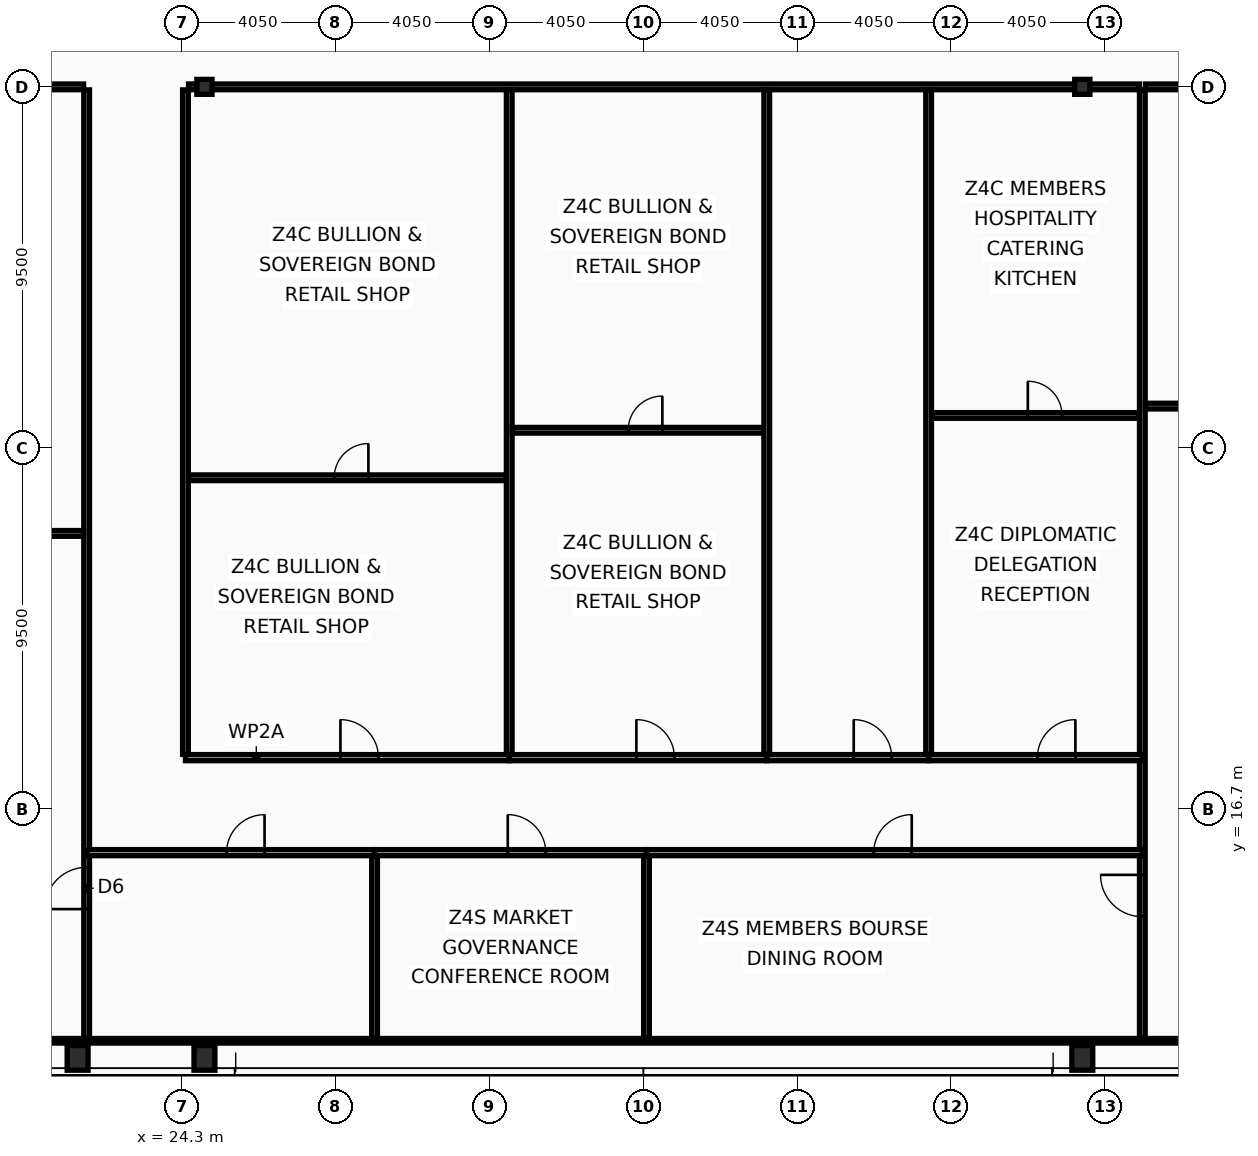
"""IFC4 building model, lengths in metres.
Left out: names, types, materials, properties, quantities, classifications, styles, units other than length and angle.
Written with IfcOpenShell. Run it as: python <this file> out.ifc"""

import sys

from ifc_helpers import new_model, si_unit, direction, frame, frame_2d, origin, origin_2d, place, context, subcontext, project, spatial, rectangle, hollow_rectangle, i_section, extrude, element, fill, save


model = new_model("IFC4")
c1 = context("Model", 3, precision=1e-05, world=origin(), true_north=direction((0.0, 1.0)))
c2 = subcontext(c1, "Body", "Model", "MODEL_VIEW")
j1 = project(units=[si_unit("LENGTHUNIT", "METRE"), si_unit("PLANEANGLEUNIT", "RADIAN")], contexts=[c1])
p1 = place(None, origin())
s1 = spatial("IfcSite", under=j1, at=p1, CompositionType="ELEMENT")
p2 = place(p1, origin())
s2 = spatial("IfcBuilding", under=s1, at=p2, CompositionType="ELEMENT")
p3 = place(p2, frame((0.0, 0.0, 347.0)))
s3 = spatial("IfcBuildingStorey", under=s2, at=p3, CompositionType="ELEMENT", Elevation=347.0)
for number, where, z_axis, x_axis in (
    (1, (21.562, 10.15, 0.0), (0.0, 0.0, 1.0), (1.0, 0.0, 0.0)),
    (2, (24.9, 10.15, 0.0), (0.0, 0.0, 1.0), (1.0, 0.0, 0.0)),
    (3, (48.0, 10.15, 0.0), (0.0, 0.0, 1.0), (1.0, 0.0, 0.0)),
):
    element("IfcColumn", number, at=place(p3, frame(where, z_axis=z_axis, x_axis=x_axis)), inside=s3, PredefinedType="COLUMN", context=c2, shape_type="SweptSolid", body=[
        extrude(hollow_rectangle(XDim=0.55, YDim=0.65, WallThickness=0.04, at=origin_2d()), origin(), (0.0, 0.0, 1.0), 3.6),
    ])
for number, where, z_axis, x_axis in (
    (4, (24.9, 35.7, 0.0), (0.0, 0.0, 1.0), (1.0, 0.0, 0.0)),
    (5, (48.0, 35.7, 0.0), (0.0, 0.0, 1.0), (1.0, 0.0, 0.0)),
):
    element("IfcColumn", number, at=place(p3, frame(where, z_axis=z_axis, x_axis=x_axis)), inside=s3, PredefinedType="COLUMN", context=c2, shape_type="SweptSolid", body=[
        extrude(i_section(OverallWidth=0.399, OverallDepth=0.393, WebThickness=0.023, FlangeThickness=0.037, at=origin_2d()), origin(), (0.0, 0.0, 1.0), 3.6),
    ])
p4 = place(p3, frame((21.8, 10.665, 0.0), z_axis=(0.0, 0.0, 1.0), x_axis=(0.0, 1.0, 0.0)))
e6 = element("IfcWall", 6, at=p4, inside=s3, PredefinedType="PARTITIONING", context=c2, shape_type="SweptSolid", body=[
    extrude(rectangle(XDim=24.955, YDim=0.15, at=frame_2d((12.478, 0.0))), origin(), (0.0, 0.0, 1.0), 3.01),
])
p5 = place(p4, frame((3.4, 0.0, 0.0)))
e7 = element("IfcOpeningElement", 7, at=p5, cuts=e6, PredefinedType="OPENING", context=c2, shape_type="SweptSolid", body=[
    extrude(rectangle(XDim=1.1, YDim=2.1, at=frame_2d((0.55, 1.05))), frame((0.0, 0.085, 0.0), z_axis=(0.0, -1.0, 0.0), x_axis=(1.0, 0.0, 0.0)), (0.0, 0.0, 1.0), 0.17),
])
p6 = place(p3, frame((12.095, 35.7, 0.0), z_axis=(0.0, 0.0, 1.0), x_axis=(1.0, 0.0, 0.0)))
e8 = element("IfcWall", 8, at=p6, inside=s3, PredefinedType="PARTITIONING", context=c2, shape_type="SweptSolid", body=[
    extrude(rectangle(XDim=9.625, YDim=0.15, at=frame_2d((4.812, 0.0))), origin(), (0.0, 0.0, 1.0), 2.77),
])
p7 = place(p6, frame((2.8, 0.0, 0.0)))
e9 = element("IfcOpeningElement", 9, at=p7, cuts=e8, PredefinedType="OPENING", context=c2, shape_type="SweptSolid", body=[
    extrude(rectangle(XDim=1.0, YDim=2.05, at=frame_2d((0.5, 1.025))), frame((0.0, 0.085, 0.0), z_axis=(0.0, -1.0, 0.0), x_axis=(1.0, 0.0, 0.0)), (0.0, 0.0, 1.0), 0.17),
])
p8 = place(p3, frame((12.095, 23.95, 0.0), z_axis=(0.0, 0.0, 1.0), x_axis=(1.0, 0.0, 0.0)))
e10 = element("IfcWall", 10, at=p8, inside=s3, PredefinedType="PARTITIONING", context=c2, shape_type="SweptSolid", body=[
    extrude(rectangle(XDim=9.625, YDim=0.15, at=frame_2d((4.812, 0.0))), origin(), (0.0, 0.0, 1.0), 2.77),
])
p9 = place(p8, frame((2.2, 0.0, 0.0)))
e11 = element("IfcOpeningElement", 11, at=p9, cuts=e10, PredefinedType="OPENING", context=c2, shape_type="SweptSolid", body=[
    extrude(rectangle(XDim=0.9, YDim=2.05, at=frame_2d((0.45, 1.025))), frame((0.0, 0.085, 0.0), z_axis=(0.0, -1.0, 0.0), x_axis=(1.0, 0.0, 0.0)), (0.0, 0.0, 1.0), 0.17),
])
p10 = place(p3, frame((24.4, 18.135, 0.0), z_axis=(0.0, 0.0, 1.0), x_axis=(0.0, 1.0, 0.0)))
e12 = element("IfcWall", 12, at=p10, inside=s3, PredefinedType="PARTITIONING", context=c2, shape_type="SweptSolid", body=[
    extrude(rectangle(XDim=17.485, YDim=0.15, at=frame_2d((8.743, 0.0))), origin(), (0.0, 0.0, 1.0), 2.77),
])
p11 = place(p3, frame((49.58, 10.665, 0.0), z_axis=(0.0, 0.0, 1.0), x_axis=(0.0, 1.0, 0.0)))
e13 = element("IfcWall", 13, at=p11, inside=s3, PredefinedType="PARTITIONING", context=c2, shape_type="SweptSolid", body=[
    extrude(rectangle(XDim=24.955, YDim=0.15, at=frame_2d((12.478, 0.0))), origin(), (0.0, 0.0, 1.0), 3.01),
])
p12 = place(p11, frame((3.2, 0.0, 0.0)))
e14 = element("IfcOpeningElement", 14, at=p12, cuts=e13, PredefinedType="OPENING", context=c2, shape_type="SweptSolid", body=[
    extrude(rectangle(XDim=1.1, YDim=2.1, at=frame_2d((0.55, 1.05))), frame((0.0, 0.085, 0.0), z_axis=(0.0, -1.0, 0.0), x_axis=(1.0, 0.0, 0.0)), (0.0, 0.0, 1.0), 0.17),
])
p13 = place(p3, frame((24.48, 35.7, 0.0), z_axis=(0.0, 0.0, 1.0), x_axis=(1.0, 0.0, 0.0)))
e15 = element("IfcWall", 15, at=p13, inside=s3, PredefinedType="PARTITIONING", context=c2, shape_type="SweptSolid", body=[
    extrude(rectangle(XDim=25.02, YDim=0.15, at=frame_2d((12.51, 0.0))), origin(), (0.0, 0.0, 1.0), 2.77),
])
p14 = place(p3, frame((49.66, 35.7, 0.0), z_axis=(0.0, 0.0, 1.0), x_axis=(1.0, 0.0, 0.0)))
e16 = element("IfcWall", 16, at=p14, inside=s3, PredefinedType="PARTITIONING", context=c2, shape_type="SweptSolid", body=[
    extrude(rectangle(XDim=11.145, YDim=0.15, at=frame_2d((5.573, 0.0))), origin(), (0.0, 0.0, 1.0), 2.77),
])
p15 = place(p14, frame((2.2, 0.0, 0.0)))
e17 = element("IfcOpeningElement", 17, at=p15, cuts=e16, PredefinedType="OPENING", context=c2, shape_type="SweptSolid", body=[
    extrude(rectangle(XDim=1.0, YDim=2.05, at=frame_2d((0.5, 1.025))), frame((0.0, 0.085, 0.0), z_axis=(0.0, -1.0, 0.0), x_axis=(1.0, 0.0, 0.0)), (0.0, 0.0, 1.0), 0.17),
])
p16 = place(p3, frame((49.66, 27.3, 0.0), z_axis=(0.0, 0.0, 1.0), x_axis=(1.0, 0.0, 0.0)))
e18 = element("IfcWall", 18, at=p16, inside=s3, PredefinedType="PARTITIONING", context=c2, shape_type="SweptSolid", body=[
    extrude(rectangle(XDim=11.145, YDim=0.15, at=frame_2d((5.573, 0.0))), origin(), (0.0, 0.0, 1.0), 2.77),
])
p17 = place(p16, frame((2.2, 0.0, 0.0)))
e19 = element("IfcOpeningElement", 19, at=p17, cuts=e18, PredefinedType="OPENING", context=c2, shape_type="SweptSolid", body=[
    extrude(rectangle(XDim=0.9, YDim=2.05, at=frame_2d((0.45, 1.025))), frame((0.0, 0.085, 0.0), z_axis=(0.0, -1.0, 0.0), x_axis=(1.0, 0.0, 0.0)), (0.0, 0.0, 1.0), 0.17),
])
p18 = place(p3, frame((24.4, 18.05, 0.0), z_axis=(0.0, 0.0, 1.0), x_axis=(1.0, 0.0, 0.0)))
e20 = element("IfcWall", 20, at=p18, inside=s3, PredefinedType="PARTITIONING", context=c2, shape_type="SweptSolid", body=[
    extrude(rectangle(XDim=8.52, YDim=0.16, at=frame_2d((4.26, 0.0))), origin(), (0.0, 0.0, 1.0), 2.77),
])
p19 = place(p18, frame((4.078, 0.0, 0.0)))
e21 = element("IfcOpeningElement", 21, at=p19, cuts=e20, PredefinedType="OPENING", context=c2, shape_type="SweptSolid", body=[
    extrude(rectangle(XDim=1.0, YDim=2.05, at=frame_2d((0.5, 1.025))), frame((0.0, 0.09, 0.0), z_axis=(0.0, -1.0, 0.0), x_axis=(1.0, 0.0, 0.0)), (0.0, 0.0, 1.0), 0.18),
])
p20 = place(p3, frame((24.48, 25.414, 0.0), z_axis=(0.0, 0.0, 1.0), x_axis=(1.0, 0.0, 0.0)))
e22 = element("IfcWall", 22, at=p20, inside=s3, PredefinedType="PARTITIONING", context=c2, shape_type="SweptSolid", body=[
    extrude(rectangle(XDim=8.36, YDim=0.15, at=frame_2d((4.18, 0.0))), origin(), (0.0, 0.0, 1.0), 2.77),
])
p21 = place(p20, frame((3.834, 0.0, 0.0)))
e23 = element("IfcOpeningElement", 23, at=p21, cuts=e22, PredefinedType="OPENING", context=c2, shape_type="SweptSolid", body=[
    extrude(rectangle(XDim=0.9, YDim=2.05, at=frame_2d((0.45, 1.025))), frame((0.0, 0.085, 0.0), z_axis=(0.0, -1.0, 0.0), x_axis=(1.0, 0.0, 0.0)), (0.0, 0.0, 1.0), 0.17),
])
p22 = place(p3, frame((32.92, 18.05, 0.0), z_axis=(0.0, 0.0, 1.0), x_axis=(1.0, 0.0, 0.0)))
e24 = element("IfcWall", 24, at=p22, inside=s3, PredefinedType="PARTITIONING", context=c2, shape_type="SweptSolid", body=[
    extrude(rectangle(XDim=6.776, YDim=0.16, at=frame_2d((3.388, 0.0))), origin(), (0.0, 0.0, 1.0), 3.38),
])
p23 = place(p22, frame((3.346, 0.0, 0.0)))
e25 = element("IfcOpeningElement", 25, at=p23, cuts=e24, PredefinedType="OPENING", context=c2, shape_type="SweptSolid", body=[
    extrude(rectangle(XDim=1.0, YDim=2.05, at=frame_2d((0.5, 1.025))), frame((0.0, 0.09, 0.0), z_axis=(0.0, -1.0, 0.0), x_axis=(1.0, 0.0, 0.0)), (0.0, 0.0, 1.0), 0.18),
])
p24 = place(p3, frame((32.92, 18.135, 0.0), z_axis=(0.0, 0.0, 1.0), x_axis=(0.0, 1.0, 0.0)))
e26 = element("IfcWall", 26, at=p24, inside=s3, PredefinedType="PARTITIONING", context=c2, shape_type="SweptSolid", body=[
    extrude(rectangle(XDim=17.485, YDim=0.15, at=frame_2d((8.743, 0.0))), origin(), (0.0, 0.0, 1.0), 3.01),
])
p25 = place(p3, frame((33.0, 26.664, 0.0), z_axis=(0.0, 0.0, 1.0), x_axis=(1.0, 0.0, 0.0)))
e27 = element("IfcWall", 27, at=p25, inside=s3, PredefinedType="PARTITIONING", context=c2, shape_type="SweptSolid", body=[
    extrude(rectangle(XDim=6.616, YDim=0.15, at=frame_2d((3.308, 0.0))), origin(), (0.0, 0.0, 1.0), 3.38),
])
p26 = place(p25, frame((3.049, 0.0, 0.0)))
e28 = element("IfcOpeningElement", 28, at=p26, cuts=e27, PredefinedType="OPENING", context=c2, shape_type="SweptSolid", body=[
    extrude(rectangle(XDim=0.9, YDim=2.05, at=frame_2d((0.45, 1.025))), frame((0.0, 0.085, 0.0), z_axis=(0.0, -1.0, 0.0), x_axis=(1.0, 0.0, 0.0)), (0.0, 0.0, 1.0), 0.17),
])
p27 = place(p3, frame((39.696, 18.05, 0.0), z_axis=(0.0, 0.0, 1.0), x_axis=(1.0, 0.0, 0.0)))
e29 = element("IfcWall", 29, at=p27, inside=s3, PredefinedType="PARTITIONING", context=c2, shape_type="SweptSolid", body=[
    extrude(rectangle(XDim=4.26, YDim=0.16, at=frame_2d((2.13, 0.0))), origin(), (0.0, 0.0, 1.0), 3.38),
])
p28 = place(p27, frame((2.289, 0.0, 0.0)))
e30 = element("IfcOpeningElement", 30, at=p28, cuts=e29, PredefinedType="OPENING", context=c2, shape_type="SweptSolid", body=[
    extrude(rectangle(XDim=1.0, YDim=2.05, at=frame_2d((0.5, 1.025))), frame((0.0, 0.09, 0.0), z_axis=(0.0, -1.0, 0.0), x_axis=(1.0, 0.0, 0.0)), (0.0, 0.0, 1.0), 0.18),
])
p29 = place(p3, frame((39.696, 18.135, 0.0), z_axis=(0.0, 0.0, 1.0), x_axis=(0.0, 1.0, 0.0)))
e31 = element("IfcWall", 31, at=p29, inside=s3, PredefinedType="PARTITIONING", context=c2, shape_type="SweptSolid", body=[
    extrude(rectangle(XDim=17.485, YDim=0.15, at=frame_2d((8.743, 0.0))), origin(), (0.0, 0.0, 1.0), 3.01),
])
p30 = place(p3, frame((43.956, 18.05, 0.0), z_axis=(0.0, 0.0, 1.0), x_axis=(1.0, 0.0, 0.0)))
e32 = element("IfcWall", 32, at=p30, inside=s3, PredefinedType="PARTITIONING", context=c2, shape_type="SweptSolid", body=[
    extrude(rectangle(XDim=5.624, YDim=0.16, at=frame_2d((2.812, 0.0))), origin(), (0.0, 0.0, 1.0), 2.77),
])
p31 = place(p30, frame((2.862, 0.0, 0.0)))
e33 = element("IfcOpeningElement", 33, at=p31, cuts=e32, PredefinedType="OPENING", context=c2, shape_type="SweptSolid", body=[
    extrude(rectangle(XDim=1.0, YDim=2.05, at=frame_2d((0.5, 1.025))), frame((0.0, 0.09, 0.0), z_axis=(0.0, -1.0, 0.0), x_axis=(1.0, 0.0, 0.0)), (0.0, 0.0, 1.0), 0.18),
])
p32 = place(p3, frame((43.956, 18.135, 0.0), z_axis=(0.0, 0.0, 1.0), x_axis=(0.0, 1.0, 0.0)))
e34 = element("IfcWall", 34, at=p32, inside=s3, PredefinedType="PARTITIONING", context=c2, shape_type="SweptSolid", body=[
    extrude(rectangle(XDim=17.485, YDim=0.15, at=frame_2d((8.743, 0.0))), origin(), (0.0, 0.0, 1.0), 3.01),
])
p33 = place(p3, frame((44.036, 27.054, 0.0), z_axis=(0.0, 0.0, 1.0), x_axis=(1.0, 0.0, 0.0)))
e35 = element("IfcWall", 35, at=p33, inside=s3, PredefinedType="PARTITIONING", context=c2, shape_type="SweptSolid", body=[
    extrude(rectangle(XDim=5.464, YDim=0.15, at=frame_2d((2.732, 0.0))), origin(), (0.0, 0.0, 1.0), 2.77),
])
p34 = place(p33, frame((2.531, 0.0, 0.0)))
e36 = element("IfcOpeningElement", 36, at=p34, cuts=e35, PredefinedType="OPENING", context=c2, shape_type="SweptSolid", body=[
    extrude(rectangle(XDim=0.9, YDim=2.05, at=frame_2d((0.45, 1.025))), frame((0.0, 0.085, 0.0), z_axis=(0.0, -1.0, 0.0), x_axis=(1.0, 0.0, 0.0)), (0.0, 0.0, 1.0), 0.17),
])
p35 = place(p3, frame((21.8, 15.55, 0.0), z_axis=(0.0, 0.0, 1.0), x_axis=(1.0, 0.0, 0.0)))
e37 = element("IfcWall", 37, at=p35, inside=s3, PredefinedType="PARTITIONING", context=c2, shape_type="SweptSolid", body=[
    extrude(rectangle(XDim=7.576, YDim=0.16, at=frame_2d((3.788, 0.0))), origin(), (0.0, 0.0, 1.0), 2.77),
])
p36 = place(p35, frame((3.682, 0.0, 0.0)))
e38 = element("IfcOpeningElement", 38, at=p36, cuts=e37, PredefinedType="OPENING", context=c2, shape_type="SweptSolid", body=[
    extrude(rectangle(XDim=1.0, YDim=2.05, at=frame_2d((0.5, 1.025))), frame((0.0, 0.09, 0.0), z_axis=(0.0, -1.0, 0.0), x_axis=(1.0, 0.0, 0.0)), (0.0, 0.0, 1.0), 0.18),
])
p37 = place(p3, frame((29.376, 15.55, 0.0), z_axis=(0.0, 0.0, 1.0), x_axis=(1.0, 0.0, 0.0)))
e39 = element("IfcWall", 39, at=p37, inside=s3, PredefinedType="PARTITIONING", context=c2, shape_type="SweptSolid", body=[
    extrude(rectangle(XDim=7.155, YDim=0.16, at=frame_2d((3.578, 0.0))), origin(), (0.0, 0.0, 1.0), 3.01),
])
p38 = place(p37, frame((3.505, 0.0, 0.0)))
e40 = element("IfcOpeningElement", 40, at=p38, cuts=e39, PredefinedType="OPENING", context=c2, shape_type="SweptSolid", body=[
    extrude(rectangle(XDim=1.0, YDim=2.05, at=frame_2d((0.5, 1.025))), frame((0.0, 0.09, 0.0), z_axis=(0.0, -1.0, 0.0), x_axis=(1.0, 0.0, 0.0)), (0.0, 0.0, 1.0), 0.18),
])
p39 = place(p3, frame((29.376, 10.665, 0.0), z_axis=(0.0, 0.0, 1.0), x_axis=(0.0, 1.0, 0.0)))
e41 = element("IfcWall", 41, at=p39, inside=s3, PredefinedType="PARTITIONING", context=c2, shape_type="SweptSolid", body=[
    extrude(rectangle(XDim=4.8, YDim=0.15, at=frame_2d((2.4, 0.0))), origin(), (0.0, 0.0, 1.0), 3.01),
])
p40 = place(p3, frame((36.532, 15.55, 0.0), z_axis=(0.0, 0.0, 1.0), x_axis=(1.0, 0.0, 0.0)))
e42 = element("IfcWall", 42, at=p40, inside=s3, PredefinedType="PARTITIONING", context=c2, shape_type="SweptSolid", body=[
    extrude(rectangle(XDim=13.048, YDim=0.16, at=frame_2d((6.524, 0.0))), origin(), (0.0, 0.0, 1.0), 2.77),
])
p41 = place(p40, frame((5.98, 0.0, 0.0)))
e43 = element("IfcOpeningElement", 43, at=p41, cuts=e42, PredefinedType="OPENING", context=c2, shape_type="SweptSolid", body=[
    extrude(rectangle(XDim=1.0, YDim=2.05, at=frame_2d((0.5, 1.025))), frame((0.0, 0.09, 0.0), z_axis=(0.0, -1.0, 0.0), x_axis=(1.0, 0.0, 0.0)), (0.0, 0.0, 1.0), 0.18),
])
p42 = place(p3, frame((36.532, 10.665, 0.0), z_axis=(0.0, 0.0, 1.0), x_axis=(0.0, 1.0, 0.0)))
e44 = element("IfcWall", 44, at=p42, inside=s3, PredefinedType="PARTITIONING", context=c2, shape_type="SweptSolid", body=[
    extrude(rectangle(XDim=4.8, YDim=0.15, at=frame_2d((2.4, 0.0))), origin(), (0.0, 0.0, 1.0), 3.01),
])
p43 = place(p3, frame((12.095, 10.6, 0.0), z_axis=(0.0, 0.0, 1.0), x_axis=(1.0, 0.0, 0.0)))
e45 = element("IfcWall", 45, at=p43, inside=s3, PredefinedType="PARTITIONING", context=c2, shape_type="SweptSolid", body=[
    extrude(rectangle(XDim=48.71, YDim=0.12, at=frame_2d((24.355, 0.0))), origin(), (0.0, 0.0, 1.0), 2.77),
])
p44 = place(p5, origin())
e46 = element("IfcDoor", 46, at=p44, inside=s3, OperationType="SINGLE_SWING_LEFT", PredefinedType="DOOR", context=c2, shape_type="SweptSolid", body=[
    extrude(rectangle(XDim=1.1, YDim=2.1, at=frame_2d((0.55, 1.05))), frame((0.0, 0.025, 0.0), z_axis=(0.0, -1.0, 0.0), x_axis=(1.0, 0.0, 0.0)), (0.0, 0.0, 1.0), 0.05),
])
fill(e7, e46)
p45 = place(p12, origin())
e47 = element("IfcDoor", 47, at=p45, inside=s3, OperationType="SINGLE_SWING_RIGHT", PredefinedType="DOOR", context=c2, shape_type="SweptSolid", body=[
    extrude(rectangle(XDim=1.1, YDim=2.1, at=frame_2d((0.55, 1.05))), frame((0.0, 0.025, 0.0), z_axis=(0.0, -1.0, 0.0), x_axis=(1.0, 0.0, 0.0)), (0.0, 0.0, 1.0), 0.05),
])
fill(e14, e47)
p46 = place(p19, origin())
e48 = element("IfcDoor", 48, at=p46, inside=s3, OperationType="SINGLE_SWING_LEFT", PredefinedType="DOOR", context=c2, shape_type="SweptSolid", body=[
    extrude(rectangle(XDim=1.0, YDim=2.05, at=frame_2d((0.5, 1.025))), frame((0.0, 0.025, 0.0), z_axis=(0.0, -1.0, 0.0), x_axis=(1.0, 0.0, 0.0)), (0.0, 0.0, 1.0), 0.05),
])
fill(e21, e48)
p47 = place(p21, origin())
e49 = element("IfcDoor", 49, at=p47, inside=s3, OperationType="SINGLE_SWING_RIGHT", PredefinedType="DOOR", context=c2, shape_type="SweptSolid", body=[
    extrude(rectangle(XDim=0.9, YDim=2.05, at=frame_2d((0.45, 1.025))), frame((0.0, 0.025, 0.0), z_axis=(0.0, -1.0, 0.0), x_axis=(1.0, 0.0, 0.0)), (0.0, 0.0, 1.0), 0.05),
])
fill(e23, e49)
p48 = place(p23, origin())
e50 = element("IfcDoor", 50, at=p48, inside=s3, OperationType="SINGLE_SWING_LEFT", PredefinedType="DOOR", context=c2, shape_type="SweptSolid", body=[
    extrude(rectangle(XDim=1.0, YDim=2.05, at=frame_2d((0.5, 1.025))), frame((0.0, 0.025, 0.0), z_axis=(0.0, -1.0, 0.0), x_axis=(1.0, 0.0, 0.0)), (0.0, 0.0, 1.0), 0.05),
])
fill(e25, e50)
p49 = place(p26, origin())
e51 = element("IfcDoor", 51, at=p49, inside=s3, OperationType="SINGLE_SWING_RIGHT", PredefinedType="DOOR", context=c2, shape_type="SweptSolid", body=[
    extrude(rectangle(XDim=0.9, YDim=2.05, at=frame_2d((0.45, 1.025))), frame((0.0, 0.025, 0.0), z_axis=(0.0, -1.0, 0.0), x_axis=(1.0, 0.0, 0.0)), (0.0, 0.0, 1.0), 0.05),
])
fill(e28, e51)
p50 = place(p28, origin())
e52 = element("IfcDoor", 52, at=p50, inside=s3, OperationType="SINGLE_SWING_LEFT", PredefinedType="DOOR", context=c2, shape_type="SweptSolid", body=[
    extrude(rectangle(XDim=1.0, YDim=2.05, at=frame_2d((0.5, 1.025))), frame((0.0, 0.025, 0.0), z_axis=(0.0, -1.0, 0.0), x_axis=(1.0, 0.0, 0.0)), (0.0, 0.0, 1.0), 0.05),
])
fill(e30, e52)
p51 = place(p31, origin())
e53 = element("IfcDoor", 53, at=p51, inside=s3, OperationType="SINGLE_SWING_RIGHT", PredefinedType="DOOR", context=c2, shape_type="SweptSolid", body=[
    extrude(rectangle(XDim=1.0, YDim=2.05, at=frame_2d((0.5, 1.025))), frame((0.0, 0.025, 0.0), z_axis=(0.0, -1.0, 0.0), x_axis=(1.0, 0.0, 0.0)), (0.0, 0.0, 1.0), 0.05),
])
fill(e33, e53)
p52 = place(p34, origin())
e54 = element("IfcDoor", 54, at=p52, inside=s3, OperationType="SINGLE_SWING_LEFT", PredefinedType="DOOR", context=c2, shape_type="SweptSolid", body=[
    extrude(rectangle(XDim=0.9, YDim=2.05, at=frame_2d((0.45, 1.025))), frame((0.0, 0.025, 0.0), z_axis=(0.0, -1.0, 0.0), x_axis=(1.0, 0.0, 0.0)), (0.0, 0.0, 1.0), 0.05),
])
fill(e36, e54)
p53 = place(p36, origin())
e55 = element("IfcDoor", 55, at=p53, inside=s3, OperationType="SINGLE_SWING_RIGHT", PredefinedType="DOOR", context=c2, shape_type="SweptSolid", body=[
    extrude(rectangle(XDim=1.0, YDim=2.05, at=frame_2d((0.5, 1.025))), frame((0.0, 0.025, 0.0), z_axis=(0.0, -1.0, 0.0), x_axis=(1.0, 0.0, 0.0)), (0.0, 0.0, 1.0), 0.05),
])
fill(e38, e55)
p54 = place(p38, origin())
e56 = element("IfcDoor", 56, at=p54, inside=s3, OperationType="SINGLE_SWING_LEFT", PredefinedType="DOOR", context=c2, shape_type="SweptSolid", body=[
    extrude(rectangle(XDim=1.0, YDim=2.05, at=frame_2d((0.5, 1.025))), frame((0.0, 0.025, 0.0), z_axis=(0.0, -1.0, 0.0), x_axis=(1.0, 0.0, 0.0)), (0.0, 0.0, 1.0), 0.05),
])
fill(e40, e56)
p55 = place(p41, origin())
e57 = element("IfcDoor", 57, at=p55, inside=s3, OperationType="SINGLE_SWING_RIGHT", PredefinedType="DOOR", context=c2, shape_type="SweptSolid", body=[
    extrude(rectangle(XDim=1.0, YDim=2.05, at=frame_2d((0.5, 1.025))), frame((0.0, 0.025, 0.0), z_axis=(0.0, -1.0, 0.0), x_axis=(1.0, 0.0, 0.0)), (0.0, 0.0, 1.0), 0.05),
])
fill(e43, e57)
save(model, sys.argv[1])
